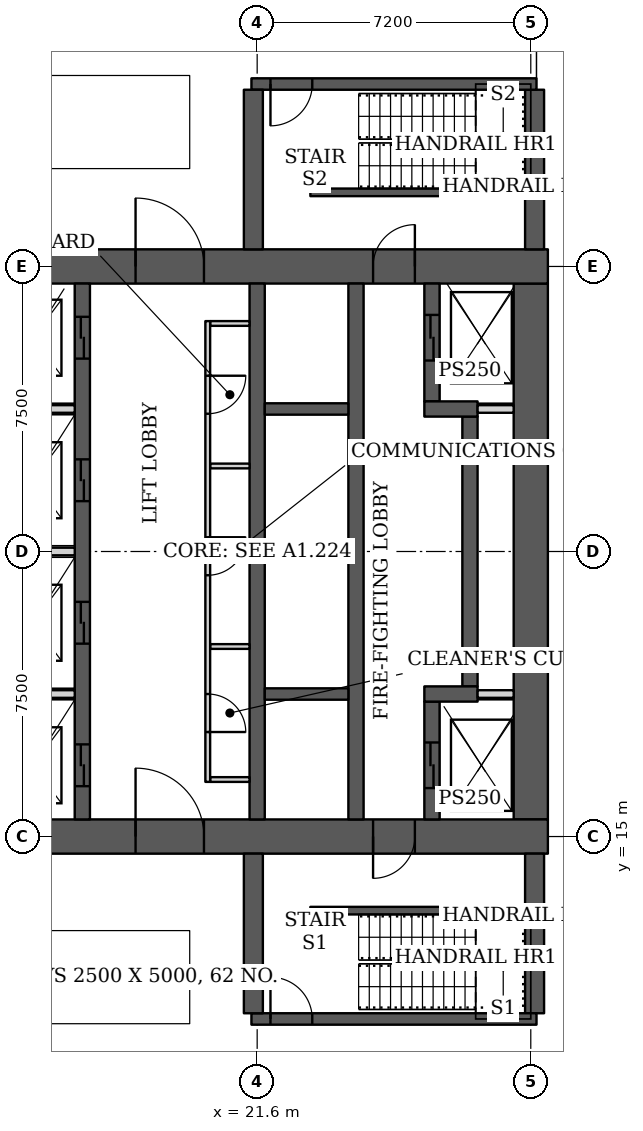
"""IFC4 building model, lengths in metres.
Left out: names, types, materials, properties, quantities, classifications, styles, units other than length and angle.
Written with IfcOpenShell. Run it as: python <this file> out.ifc"""

import sys

from ifc_helpers import new_model, si_unit, direction, frame, frame_2d, origin, place, context, subcontext, project, spatial, rectangle, extrude, element, fill, save


model = new_model("IFC4")
c1 = context("Model", 3, precision=1e-05, world=origin(), true_north=direction((0.0, 1.0)))
c2 = subcontext(c1, "Body", "Model", "MODEL_VIEW")
j1 = project(units=[si_unit("LENGTHUNIT", "METRE"), si_unit("PLANEANGLEUNIT", "RADIAN")], contexts=[c1])
p1 = place(None, origin())
s1 = spatial("IfcSite", under=j1, at=p1, CompositionType="ELEMENT")
p2 = place(p1, origin())
s2 = spatial("IfcBuilding", under=s1, at=p2, CompositionType="ELEMENT")
p3 = place(p2, frame((0.0, 0.0, -8.0)))
s3 = spatial("IfcBuildingStorey", under=s2, at=p3, CompositionType="ELEMENT", Elevation=-8.0)
p4 = place(p3, frame((13.95, 15.0, 0.0), z_axis=(0.0, 0.0, 1.0), x_axis=(1.0, 0.0, 0.0)))
e1 = element("IfcWall", 1, at=p4, inside=s3, PredefinedType="SHEAR", context=c2, shape_type="SweptSolid", body=[
    extrude(rectangle(XDim=15.3, YDim=0.9, at=frame_2d((7.65, 0.0))), origin(), (0.0, 0.0, 1.0), 4.0),
])
p5 = place(p4, frame((4.45, 0.0, 0.0)))
e2 = element("IfcOpeningElement", 2, at=p5, cuts=e1, PredefinedType="OPENING", context=c2, shape_type="SweptSolid", body=[
    extrude(rectangle(XDim=1.8, YDim=2.1, at=frame_2d((0.9, 1.05))), frame((0.0, 0.46, 0.0), z_axis=(0.0, -1.0, 0.0), x_axis=(1.0, 0.0, 0.0)), (0.0, 0.0, 1.0), 0.92),
])
p6 = place(p4, frame((10.7, 0.0, 0.0)))
e3 = element("IfcOpeningElement", 3, at=p6, cuts=e1, PredefinedType="OPENING", context=c2, shape_type="SweptSolid", body=[
    extrude(rectangle(XDim=1.1, YDim=2.1, at=frame_2d((0.55, 1.05))), frame((0.0, 0.46, 0.0), z_axis=(0.0, -1.0, 0.0), x_axis=(1.0, 0.0, 0.0)), (0.0, 0.0, 1.0), 0.92),
])
p7 = place(p3, frame((13.95, 30.0, 0.0), z_axis=(0.0, 0.0, 1.0), x_axis=(1.0, 0.0, 0.0)))
e4 = element("IfcWall", 4, at=p7, inside=s3, PredefinedType="SHEAR", context=c2, shape_type="SweptSolid", body=[
    extrude(rectangle(XDim=15.3, YDim=0.9, at=frame_2d((7.65, 0.0))), origin(), (0.0, 0.0, 1.0), 4.0),
])
p8 = place(p7, frame((4.45, 0.0, 0.0)))
e5 = element("IfcOpeningElement", 5, at=p8, cuts=e4, PredefinedType="OPENING", context=c2, shape_type="SweptSolid", body=[
    extrude(rectangle(XDim=1.8, YDim=2.1, at=frame_2d((0.9, 1.05))), frame((0.0, 0.46, 0.0), z_axis=(0.0, -1.0, 0.0), x_axis=(1.0, 0.0, 0.0)), (0.0, 0.0, 1.0), 0.92),
])
p9 = place(p7, frame((10.7, 0.0, 0.0)))
e6 = element("IfcOpeningElement", 6, at=p9, cuts=e4, PredefinedType="OPENING", context=c2, shape_type="SweptSolid", body=[
    extrude(rectangle(XDim=1.1, YDim=2.1, at=frame_2d((0.55, 1.05))), frame((0.0, 0.46, 0.0), z_axis=(0.0, -1.0, 0.0), x_axis=(1.0, 0.0, 0.0)), (0.0, 0.0, 1.0), 0.92),
])
p10 = place(p3, frame((28.8, 15.45, 0.0), z_axis=(0.0, 0.0, 1.0), x_axis=(0.0, 1.0, 0.0)))
e7 = element("IfcWall", 7, at=p10, inside=s3, PredefinedType="SHEAR", context=c2, shape_type="SweptSolid", body=[
    extrude(rectangle(XDim=14.1, YDim=0.9, at=frame_2d((7.05, 0.0))), origin(), (0.0, 0.0, 1.0), 4.0),
])
p11 = place(p3, frame((17.0, 15.45, 0.0), z_axis=(0.0, 0.0, 1.0), x_axis=(0.0, 1.0, 0.0)))
e8 = element("IfcWall", 8, at=p11, inside=s3, PredefinedType="SHEAR", context=c2, shape_type="SweptSolid", body=[
    extrude(rectangle(XDim=14.1, YDim=0.4, at=frame_2d((7.05, 0.0))), origin(), (0.0, 0.0, 1.0), 4.0),
])
p12 = place(p11, frame((0.875, 0.0, 0.0)))
e9 = element("IfcOpeningElement", 9, at=p12, cuts=e8, PredefinedType="OPENING", context=c2, shape_type="SweptSolid", body=[
    extrude(rectangle(XDim=1.1, YDim=2.1, at=frame_2d((0.55, 1.05))), frame((0.0, 0.21, 0.0), z_axis=(0.0, -1.0, 0.0), x_axis=(1.0, 0.0, 0.0)), (0.0, 0.0, 1.0), 0.42),
])
p13 = place(p11, frame((4.625, 0.0, 0.0)))
e10 = element("IfcOpeningElement", 10, at=p13, cuts=e8, PredefinedType="OPENING", context=c2, shape_type="SweptSolid", body=[
    extrude(rectangle(XDim=1.1, YDim=2.1, at=frame_2d((0.55, 1.05))), frame((0.0, 0.21, 0.0), z_axis=(0.0, -1.0, 0.0), x_axis=(1.0, 0.0, 0.0)), (0.0, 0.0, 1.0), 0.42),
])
p14 = place(p11, frame((8.375, 0.0, 0.0)))
e11 = element("IfcOpeningElement", 11, at=p14, cuts=e8, PredefinedType="OPENING", context=c2, shape_type="SweptSolid", body=[
    extrude(rectangle(XDim=1.1, YDim=2.1, at=frame_2d((0.55, 1.05))), frame((0.0, 0.21, 0.0), z_axis=(0.0, -1.0, 0.0), x_axis=(1.0, 0.0, 0.0)), (0.0, 0.0, 1.0), 0.42),
])
p15 = place(p11, frame((12.125, 0.0, 0.0)))
e12 = element("IfcOpeningElement", 12, at=p15, cuts=e8, PredefinedType="OPENING", context=c2, shape_type="SweptSolid", body=[
    extrude(rectangle(XDim=1.1, YDim=2.1, at=frame_2d((0.55, 1.05))), frame((0.0, 0.21, 0.0), z_axis=(0.0, -1.0, 0.0), x_axis=(1.0, 0.0, 0.0)), (0.0, 0.0, 1.0), 0.42),
])
for number, where, z_axis, x_axis in (
    (13, (21.6, 15.45, 0.0), (0.0, 0.0, 1.0), (0.0, 1.0, 0.0)),
    (14, (24.2, 15.45, 0.0), (0.0, 0.0, 1.0), (0.0, 1.0, 0.0)),
):
    element("IfcWall", number, at=place(p3, frame(where, z_axis=z_axis, x_axis=x_axis)), inside=s3, PredefinedType="SHEAR", context=c2, shape_type="SweptSolid", body=[
        extrude(rectangle(XDim=14.1, YDim=0.4, at=frame_2d((7.05, 0.0))), origin(), (0.0, 0.0, 1.0), 4.0),
    ])
p16 = place(p3, frame((26.2, 15.45, 0.0), z_axis=(0.0, 0.0, 1.0), x_axis=(0.0, 1.0, 0.0)))
e15 = element("IfcWall", 15, at=p16, inside=s3, PredefinedType="SHEAR", context=c2, shape_type="SweptSolid", body=[
    extrude(rectangle(XDim=3.1, YDim=0.4, at=frame_2d((1.55, 0.0))), origin(), (0.0, 0.0, 1.0), 4.0),
])
p17 = place(p16, frame((0.825, 0.0, 0.0)))
e16 = element("IfcOpeningElement", 16, at=p17, cuts=e15, PredefinedType="OPENING", context=c2, shape_type="SweptSolid", body=[
    extrude(rectangle(XDim=1.2, YDim=2.1, at=frame_2d((0.6, 1.05))), frame((0.0, 0.21, 0.0), z_axis=(0.0, -1.0, 0.0), x_axis=(1.0, 0.0, 0.0)), (0.0, 0.0, 1.0), 0.42),
])
p18 = place(p3, frame((26.0, 18.75, 0.0), z_axis=(0.0, 0.0, 1.0), x_axis=(1.0, 0.0, 0.0)))
e17 = element("IfcWall", 17, at=p18, inside=s3, PredefinedType="SHEAR", context=c2, shape_type="SweptSolid", body=[
    extrude(rectangle(XDim=1.4, YDim=0.4, at=frame_2d((0.7, 0.0))), origin(), (0.0, 0.0, 1.0), 4.0),
])
p19 = place(p3, frame((27.2, 18.95, 0.0), z_axis=(0.0, 0.0, 1.0), x_axis=(0.0, 1.0, 0.0)))
e18 = element("IfcWall", 18, at=p19, inside=s3, PredefinedType="SHEAR", context=c2, shape_type="SweptSolid", body=[
    extrude(rectangle(XDim=7.1, YDim=0.4, at=frame_2d((3.55, 0.0))), origin(), (0.0, 0.0, 1.0), 4.0),
])
p20 = place(p3, frame((26.0, 26.25, 0.0), z_axis=(0.0, 0.0, 1.0), x_axis=(1.0, 0.0, 0.0)))
e19 = element("IfcWall", 19, at=p20, inside=s3, PredefinedType="SHEAR", context=c2, shape_type="SweptSolid", body=[
    extrude(rectangle(XDim=1.4, YDim=0.4, at=frame_2d((0.7, 0.0))), origin(), (0.0, 0.0, 1.0), 4.0),
])
p21 = place(p3, frame((26.2, 26.45, 0.0), z_axis=(0.0, 0.0, 1.0), x_axis=(0.0, 1.0, 0.0)))
e20 = element("IfcWall", 20, at=p21, inside=s3, PredefinedType="SHEAR", context=c2, shape_type="SweptSolid", body=[
    extrude(rectangle(XDim=3.1, YDim=0.4, at=frame_2d((1.55, 0.0))), origin(), (0.0, 0.0, 1.0), 4.0),
])
p22 = place(p21, frame((1.075, 0.0, 0.0)))
e21 = element("IfcOpeningElement", 21, at=p22, cuts=e20, PredefinedType="OPENING", context=c2, shape_type="SweptSolid", body=[
    extrude(rectangle(XDim=1.2, YDim=2.1, at=frame_2d((0.6, 1.05))), frame((0.0, 0.21, 0.0), z_axis=(0.0, -1.0, 0.0), x_axis=(1.0, 0.0, 0.0)), (0.0, 0.0, 1.0), 0.42),
])
p23 = place(p3, frame((21.45, 10.2, 0.0), z_axis=(0.0, 0.0, 1.0), x_axis=(1.0, 0.0, 0.0)))
e22 = element("IfcWall", 22, at=p23, inside=s3, PredefinedType="SHEAR", context=c2, shape_type="SweptSolid", body=[
    extrude(rectangle(XDim=7.5, YDim=0.3, at=frame_2d((3.75, 0.0))), origin(), (0.0, 0.0, 1.0), 4.0),
])
p24 = place(p23, frame((0.5, 0.0, 0.0)))
e23 = element("IfcOpeningElement", 23, at=p24, cuts=e22, PredefinedType="OPENING", context=c2, shape_type="SweptSolid", body=[
    extrude(rectangle(XDim=1.1, YDim=2.1, at=frame_2d((0.55, 1.05))), frame((0.0, 0.16, 0.0), z_axis=(0.0, -1.0, 0.0), x_axis=(1.0, 0.0, 0.0)), (0.0, 0.0, 1.0), 0.32),
])
for number, where, z_axis, x_axis in (
    (24, (21.5, 10.35, 0.0), (0.0, 0.0, 1.0), (0.0, 1.0, 0.0)),
    (25, (28.9, 10.35, 0.0), (0.0, 0.0, 1.0), (0.0, 1.0, 0.0)),
):
    element("IfcWall", number, at=place(p3, frame(where, z_axis=z_axis, x_axis=x_axis)), inside=s3, PredefinedType="SHEAR", context=c2, shape_type="SweptSolid", body=[
        extrude(rectangle(XDim=4.2, YDim=0.5, at=frame_2d((2.1, 0.0))), origin(), (0.0, 0.0, 1.0), 4.0),
    ])
p25 = place(p3, frame((21.45, 34.8, 0.0), z_axis=(0.0, 0.0, 1.0), x_axis=(1.0, 0.0, 0.0)))
e26 = element("IfcWall", 26, at=p25, inside=s3, PredefinedType="SHEAR", context=c2, shape_type="SweptSolid", body=[
    extrude(rectangle(XDim=7.5, YDim=0.3, at=frame_2d((3.75, 0.0))), origin(), (0.0, 0.0, 1.0), 4.0),
])
p26 = place(p25, frame((0.5, 0.0, 0.0)))
e27 = element("IfcOpeningElement", 27, at=p26, cuts=e26, PredefinedType="OPENING", context=c2, shape_type="SweptSolid", body=[
    extrude(rectangle(XDim=1.1, YDim=2.1, at=frame_2d((0.55, 1.05))), frame((0.0, 0.16, 0.0), z_axis=(0.0, -1.0, 0.0), x_axis=(1.0, 0.0, 0.0)), (0.0, 0.0, 1.0), 0.32),
])
for number, where, z_axis, x_axis in (
    (28, (21.5, 30.45, 0.0), (0.0, 0.0, 1.0), (0.0, 1.0, 0.0)),
    (29, (28.9, 30.45, 0.0), (0.0, 0.0, 1.0), (0.0, 1.0, 0.0)),
):
    element("IfcWall", number, at=place(p3, frame(where, z_axis=z_axis, x_axis=x_axis)), inside=s3, PredefinedType="SHEAR", context=c2, shape_type="SweptSolid", body=[
        extrude(rectangle(XDim=4.2, YDim=0.5, at=frame_2d((2.1, 0.0))), origin(), (0.0, 0.0, 1.0), 4.0),
    ])
p27 = place(p3, frame((20.3, 16.438, 0.0), z_axis=(0.0, 0.0, 1.0), x_axis=(0.0, 1.0, 0.0)))
e30 = element("IfcWall", 30, at=p27, inside=s3, PredefinedType="PARTITIONING", context=c2, shape_type="SweptSolid", body=[
    extrude(rectangle(XDim=12.124, YDim=0.125, at=frame_2d((6.062, 0.0))), origin(), (0.0, 0.0, 1.0), 3.55),
])
p28 = place(p27, frame((1.312, 0.0, 0.0)))
e31 = element("IfcOpeningElement", 31, at=p28, cuts=e30, PredefinedType="OPENING", context=c2, shape_type="SweptSolid", body=[
    extrude(rectangle(XDim=1.0, YDim=2.1, at=frame_2d((0.5, 1.05))), frame((0.0, 0.073, 0.0), z_axis=(0.0, -1.0, 0.0), x_axis=(1.0, 0.0, 0.0)), (0.0, 0.0, 1.0), 0.145),
])
p29 = place(p27, frame((5.437, 0.0, 0.0)))
e32 = element("IfcOpeningElement", 32, at=p29, cuts=e30, PredefinedType="OPENING", context=c2, shape_type="SweptSolid", body=[
    extrude(rectangle(XDim=1.0, YDim=2.1, at=frame_2d((0.5, 1.05))), frame((0.0, 0.073, 0.0), z_axis=(0.0, -1.0, 0.0), x_axis=(1.0, 0.0, 0.0)), (0.0, 0.0, 1.0), 0.145),
])
p30 = place(p27, frame((9.687, 0.0, 0.0)))
e33 = element("IfcOpeningElement", 33, at=p30, cuts=e30, PredefinedType="OPENING", context=c2, shape_type="SweptSolid", body=[
    extrude(rectangle(XDim=1.0, YDim=2.1, at=frame_2d((0.5, 1.05))), frame((0.0, 0.073, 0.0), z_axis=(0.0, -1.0, 0.0), x_axis=(1.0, 0.0, 0.0)), (0.0, 0.0, 1.0), 0.145),
])
for number, where, z_axis, x_axis in (
    (34, (20.363, 16.5, 0.0), (0.0, 0.0, 1.0), (1.0, 0.0, 0.0)),
    (35, (20.363, 28.5, 0.0), (0.0, 0.0, 1.0), (1.0, 0.0, 0.0)),
    (36, (20.363, 20.0, 0.0), (0.0, 0.0, 1.0), (1.0, 0.0, 0.0)),
    (37, (20.363, 24.75, 0.0), (0.0, 0.0, 1.0), (1.0, 0.0, 0.0)),
):
    element("IfcWall", number, at=place(p3, frame(where, z_axis=z_axis, x_axis=x_axis)), inside=s3, PredefinedType="PARTITIONING", context=c2, shape_type="SweptSolid", body=[
        extrude(rectangle(XDim=1.037, YDim=0.125, at=frame_2d((0.519, 0.0))), origin(), (0.0, 0.0, 1.0), 3.55),
    ])
for number, where, z_axis, x_axis in (
    (38, (23.0, 13.05, 0.0), (0.0, 0.0, 1.0), (1.0, 0.0, 0.0)),
    (39, (23.0, 31.95, 0.0), (0.0, 0.0, 1.0), (1.0, 0.0, 0.0)),
):
    element("IfcWall", number, at=place(p3, frame(where, z_axis=z_axis, x_axis=x_axis)), inside=s3, PredefinedType="SHEAR", context=c2, shape_type="SweptSolid", body=[
        extrude(rectangle(XDim=5.8, YDim=0.2, at=frame_2d((2.9, 0.0))), origin(), (0.0, 0.0, 1.0), 4.0),
    ])
p31 = place(p3, frame((14.85, 18.75, 0.0), z_axis=(0.0, 0.0, 1.0), x_axis=(1.0, 0.0, 0.0)))
e40 = element("IfcWall", 40, at=p31, inside=s3, PredefinedType="SOLIDWALL", context=c2, shape_type="SweptSolid", body=[
    extrude(rectangle(XDim=1.95, YDim=0.2, at=frame_2d((0.975, 0.0))), origin(), (0.0, 0.0, 1.0), 3.55),
])
p32 = place(p3, frame((21.8, 18.75, 0.0), z_axis=(0.0, 0.0, 1.0), x_axis=(1.0, 0.0, 0.0)))
e41 = element("IfcWall", 41, at=p32, inside=s3, PredefinedType="SHEAR", context=c2, shape_type="SweptSolid", body=[
    extrude(rectangle(XDim=2.2, YDim=0.3, at=frame_2d((1.1, 0.0))), origin(), (0.0, 0.0, 1.0), 4.0),
])
p33 = place(p3, frame((14.85, 22.5, 0.0), z_axis=(0.0, 0.0, 1.0), x_axis=(1.0, 0.0, 0.0)))
e42 = element("IfcWall", 42, at=p33, inside=s3, PredefinedType="SOLIDWALL", context=c2, shape_type="SweptSolid", body=[
    extrude(rectangle(XDim=1.95, YDim=0.2, at=frame_2d((0.975, 0.0))), origin(), (0.0, 0.0, 1.0), 3.55),
])
p34 = place(p3, frame((21.8, 22.5, 0.0), z_axis=(0.0, 0.0, 1.0), x_axis=(1.0, 0.0, 0.0)))
e43 = element("IfcWall", 43, at=p34, inside=s3, PredefinedType="SHEAR", context=c2, shape_type="SweptSolid", body=[
    extrude(rectangle(XDim=2.2, YDim=0.3, at=frame_2d((1.1, 0.0))), origin(), (0.0, 0.0, 1.0), 4.0),
])
p35 = place(p3, frame((14.85, 26.25, 0.0), z_axis=(0.0, 0.0, 1.0), x_axis=(1.0, 0.0, 0.0)))
e44 = element("IfcWall", 44, at=p35, inside=s3, PredefinedType="SOLIDWALL", context=c2, shape_type="SweptSolid", body=[
    extrude(rectangle(XDim=1.95, YDim=0.2, at=frame_2d((0.975, 0.0))), origin(), (0.0, 0.0, 1.0), 3.55),
])
p36 = place(p3, frame((21.8, 26.25, 0.0), z_axis=(0.0, 0.0, 1.0), x_axis=(1.0, 0.0, 0.0)))
e45 = element("IfcWall", 45, at=p36, inside=s3, PredefinedType="SHEAR", context=c2, shape_type="SweptSolid", body=[
    extrude(rectangle(XDim=2.2, YDim=0.3, at=frame_2d((1.1, 0.0))), origin(), (0.0, 0.0, 1.0), 4.0),
])
for number, where, z_axis, x_axis in (
    (46, (27.4, 18.75, 0.0), (0.0, 0.0, 1.0), (1.0, 0.0, 0.0)),
    (47, (27.4, 26.25, 0.0), (0.0, 0.0, 1.0), (1.0, 0.0, 0.0)),
):
    element("IfcWall", number, at=place(p3, frame(where, z_axis=z_axis, x_axis=x_axis)), inside=s3, PredefinedType="SOLIDWALL", context=c2, shape_type="SweptSolid", body=[
        extrude(rectangle(XDim=0.95, YDim=0.2, at=frame_2d((0.475, 0.0))), origin(), (0.0, 0.0, 1.0), 3.55),
    ])
p37 = place(p28, origin())
e48 = element("IfcDoor", 48, at=p37, inside=s3, OperationType="SINGLE_SWING_RIGHT", PredefinedType="DOOR", context=c2, shape_type="SweptSolid", body=[
    extrude(rectangle(XDim=1.0, YDim=2.1, at=frame_2d((0.5, 1.05))), frame((0.0, 0.025, 0.0), z_axis=(0.0, -1.0, 0.0), x_axis=(1.0, 0.0, 0.0)), (0.0, 0.0, 1.0), 0.05),
])
fill(e31, e48)
p38 = place(p29, origin())
e49 = element("IfcDoor", 49, at=p38, inside=s3, OperationType="SINGLE_SWING_LEFT", PredefinedType="DOOR", context=c2, shape_type="SweptSolid", body=[
    extrude(rectangle(XDim=1.0, YDim=2.1, at=frame_2d((0.5, 1.05))), frame((0.0, 0.025, 0.0), z_axis=(0.0, -1.0, 0.0), x_axis=(1.0, 0.0, 0.0)), (0.0, 0.0, 1.0), 0.05),
])
fill(e32, e49)
p39 = place(p30, origin())
e50 = element("IfcDoor", 50, at=p39, inside=s3, OperationType="SINGLE_SWING_LEFT", PredefinedType="DOOR", context=c2, shape_type="SweptSolid", body=[
    extrude(rectangle(XDim=1.0, YDim=2.1, at=frame_2d((0.5, 1.05))), frame((0.0, 0.025, 0.0), z_axis=(0.0, -1.0, 0.0), x_axis=(1.0, 0.0, 0.0)), (0.0, 0.0, 1.0), 0.05),
])
fill(e33, e50)
p40 = place(p5, origin())
e51 = element("IfcDoor", 51, at=p40, inside=s3, OperationType="DOUBLE_DOOR_SINGLE_SWING", PredefinedType="DOOR", context=c2, shape_type="SweptSolid", body=[
    extrude(rectangle(XDim=1.8, YDim=2.1, at=frame_2d((0.9, 1.05))), frame((0.0, 0.025, 0.0), z_axis=(0.0, -1.0, 0.0), x_axis=(1.0, 0.0, 0.0)), (0.0, 0.0, 1.0), 0.05),
])
fill(e2, e51)
p41 = place(p6, origin())
e52 = element("IfcDoor", 52, at=p41, inside=s3, OperationType="SINGLE_SWING_RIGHT", PredefinedType="DOOR", context=c2, shape_type="SweptSolid", body=[
    extrude(rectangle(XDim=1.1, YDim=2.1, at=frame_2d((0.55, 1.05))), frame((0.0, 0.025, 0.0), z_axis=(0.0, -1.0, 0.0), x_axis=(1.0, 0.0, 0.0)), (0.0, 0.0, 1.0), 0.05),
])
fill(e3, e52)
p42 = place(p8, origin())
e53 = element("IfcDoor", 53, at=p42, inside=s3, OperationType="DOUBLE_DOOR_SINGLE_SWING", PredefinedType="DOOR", context=c2, shape_type="SweptSolid", body=[
    extrude(rectangle(XDim=1.8, YDim=2.1, at=frame_2d((0.9, 1.05))), frame((0.0, 0.025, 0.0), z_axis=(0.0, -1.0, 0.0), x_axis=(1.0, 0.0, 0.0)), (0.0, 0.0, 1.0), 0.05),
])
fill(e5, e53)
p43 = place(p9, origin())
e54 = element("IfcDoor", 54, at=p43, inside=s3, OperationType="SINGLE_SWING_RIGHT", PredefinedType="DOOR", context=c2, shape_type="SweptSolid", body=[
    extrude(rectangle(XDim=1.1, YDim=2.1, at=frame_2d((0.55, 1.05))), frame((0.0, 0.025, 0.0), z_axis=(0.0, -1.0, 0.0), x_axis=(1.0, 0.0, 0.0)), (0.0, 0.0, 1.0), 0.05),
])
fill(e6, e54)
p44 = place(p17, origin())
e55 = element("IfcDoor", 55, at=p44, inside=s3, OperationType="DOUBLE_DOOR_SLIDING", PredefinedType="DOOR", context=c2, shape_type="SweptSolid", body=[
    extrude(rectangle(XDim=1.2, YDim=2.1, at=frame_2d((0.6, 1.05))), frame((0.0, 0.025, 0.0), z_axis=(0.0, -1.0, 0.0), x_axis=(1.0, 0.0, 0.0)), (0.0, 0.0, 1.0), 0.05),
])
fill(e16, e55)
p45 = place(p22, origin())
e56 = element("IfcDoor", 56, at=p45, inside=s3, OperationType="DOUBLE_DOOR_SLIDING", PredefinedType="DOOR", context=c2, shape_type="SweptSolid", body=[
    extrude(rectangle(XDim=1.2, YDim=2.1, at=frame_2d((0.6, 1.05))), frame((0.0, 0.025, 0.0), z_axis=(0.0, -1.0, 0.0), x_axis=(1.0, 0.0, 0.0)), (0.0, 0.0, 1.0), 0.05),
])
fill(e21, e56)
p46 = place(p12, origin())
e57 = element("IfcDoor", 57, at=p46, inside=s3, OperationType="DOUBLE_DOOR_SLIDING", PredefinedType="DOOR", context=c2, shape_type="SweptSolid", body=[
    extrude(rectangle(XDim=1.1, YDim=2.1, at=frame_2d((0.55, 1.05))), frame((0.0, 0.025, 0.0), z_axis=(0.0, -1.0, 0.0), x_axis=(1.0, 0.0, 0.0)), (0.0, 0.0, 1.0), 0.05),
])
fill(e9, e57)
p47 = place(p13, origin())
e58 = element("IfcDoor", 58, at=p47, inside=s3, OperationType="DOUBLE_DOOR_SLIDING", PredefinedType="DOOR", context=c2, shape_type="SweptSolid", body=[
    extrude(rectangle(XDim=1.1, YDim=2.1, at=frame_2d((0.55, 1.05))), frame((0.0, 0.025, 0.0), z_axis=(0.0, -1.0, 0.0), x_axis=(1.0, 0.0, 0.0)), (0.0, 0.0, 1.0), 0.05),
])
fill(e10, e58)
p48 = place(p14, origin())
e59 = element("IfcDoor", 59, at=p48, inside=s3, OperationType="DOUBLE_DOOR_SLIDING", PredefinedType="DOOR", context=c2, shape_type="SweptSolid", body=[
    extrude(rectangle(XDim=1.1, YDim=2.1, at=frame_2d((0.55, 1.05))), frame((0.0, 0.025, 0.0), z_axis=(0.0, -1.0, 0.0), x_axis=(1.0, 0.0, 0.0)), (0.0, 0.0, 1.0), 0.05),
])
fill(e11, e59)
p49 = place(p15, origin())
e60 = element("IfcDoor", 60, at=p49, inside=s3, OperationType="DOUBLE_DOOR_SLIDING", PredefinedType="DOOR", context=c2, shape_type="SweptSolid", body=[
    extrude(rectangle(XDim=1.1, YDim=2.1, at=frame_2d((0.55, 1.05))), frame((0.0, 0.025, 0.0), z_axis=(0.0, -1.0, 0.0), x_axis=(1.0, 0.0, 0.0)), (0.0, 0.0, 1.0), 0.05),
])
fill(e12, e60)
p50 = place(p24, origin())
e61 = element("IfcDoor", 61, at=p50, inside=s3, OperationType="SINGLE_SWING_LEFT", PredefinedType="DOOR", context=c2, shape_type="SweptSolid", body=[
    extrude(rectangle(XDim=1.1, YDim=2.1, at=frame_2d((0.55, 1.05))), frame((0.0, 0.025, 0.0), z_axis=(0.0, -1.0, 0.0), x_axis=(1.0, 0.0, 0.0)), (0.0, 0.0, 1.0), 0.05),
])
fill(e23, e61)
p51 = place(p26, origin())
e62 = element("IfcDoor", 62, at=p51, inside=s3, OperationType="SINGLE_SWING_RIGHT", PredefinedType="DOOR", context=c2, shape_type="SweptSolid", body=[
    extrude(rectangle(XDim=1.1, YDim=2.1, at=frame_2d((0.55, 1.05))), frame((0.0, 0.025, 0.0), z_axis=(0.0, -1.0, 0.0), x_axis=(1.0, 0.0, 0.0)), (0.0, 0.0, 1.0), 0.05),
])
fill(e27, e62)
save(model, sys.argv[1])
